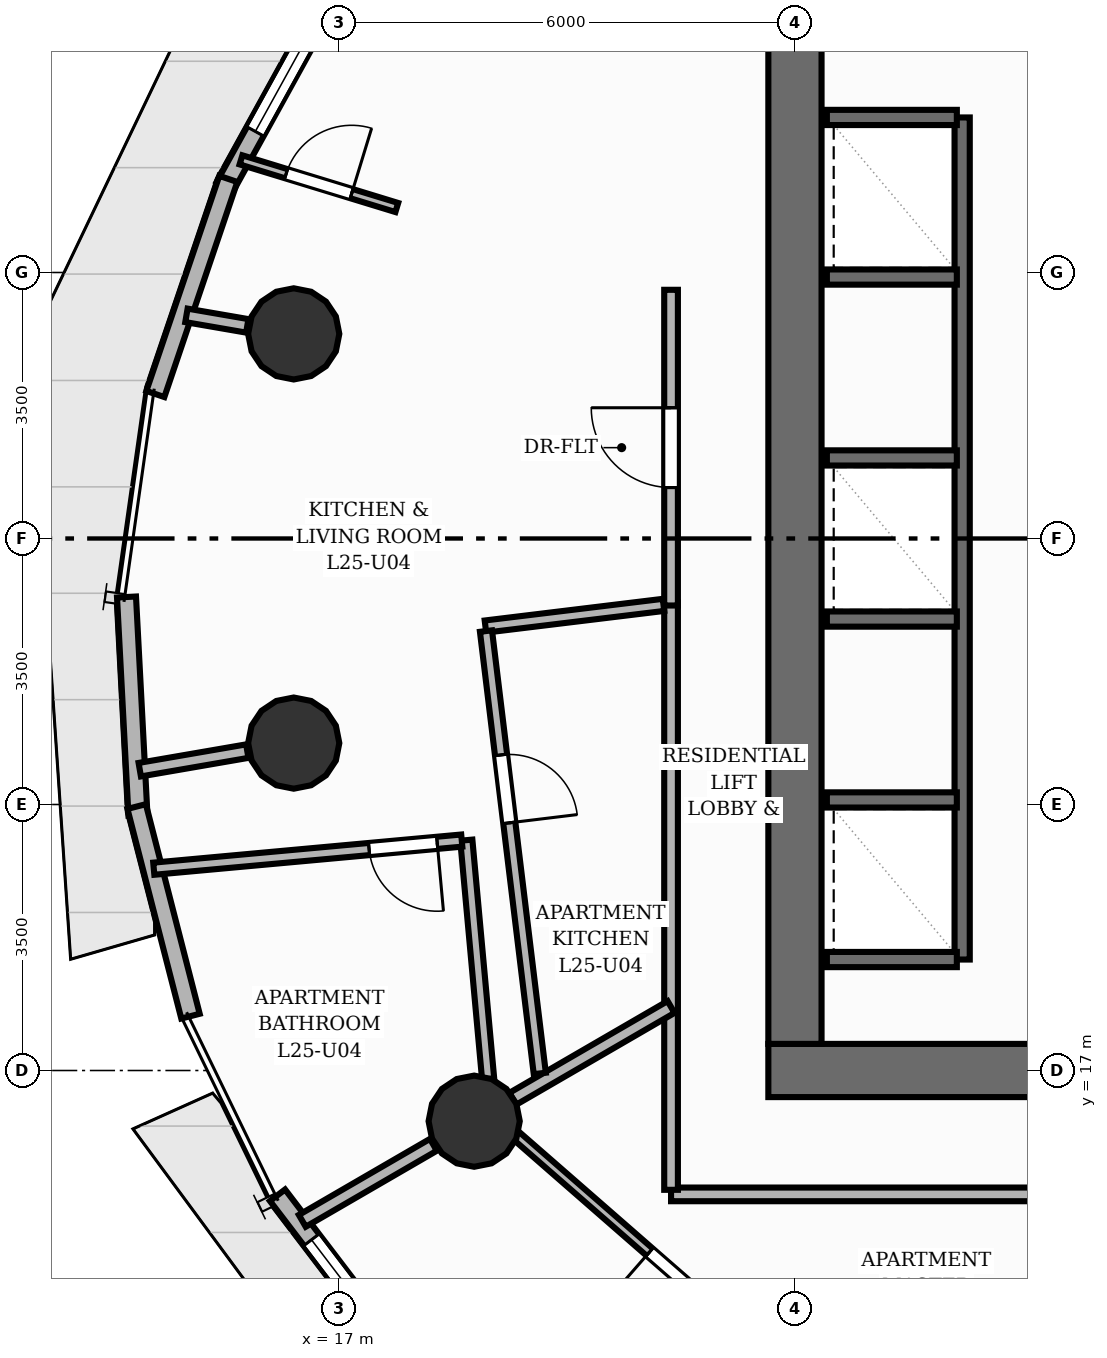
"""IFC4 building model, lengths in metres.
Left out: names, types, materials, properties, quantities, classifications, styles, units other than length and angle.
Written with IfcOpenShell. Run it as: python <this file> out.ifc"""

import sys

from ifc_helpers import new_model, si_unit, direction, frame, frame_2d, origin, origin_2d, place, context, subcontext, project, spatial, rectangle, circle, extrude, element, fill, save


model = new_model("IFC4")
c1 = context("Model", 3, precision=1e-05, world=origin(), true_north=direction((0.0, 1.0)))
c2 = subcontext(c1, "Body", "Model", "MODEL_VIEW")
j1 = project(units=[si_unit("LENGTHUNIT", "METRE"), si_unit("PLANEANGLEUNIT", "RADIAN")], contexts=[c1])
p1 = place(None, origin())
s1 = spatial("IfcSite", under=j1, at=p1, CompositionType="ELEMENT")
p2 = place(p1, origin())
s2 = spatial("IfcBuilding", under=s1, at=p2, CompositionType="ELEMENT")
p3 = place(p2, frame((0.0, 0.0, 86.88)))
s3 = spatial("IfcBuildingStorey", under=s2, at=p3, CompositionType="ELEMENT", Elevation=86.88)
p4 = place(p3, frame((22.65, 17.0, 0.0), z_axis=(0.0, 0.0, 1.0), x_axis=(1.0, 0.0, 0.0)))
e1 = element("IfcWall", 1, at=p4, inside=s3, PredefinedType="SHEAR", context=c2, shape_type="SweptSolid", body=[
    extrude(rectangle(XDim=18.7, YDim=0.7, at=frame_2d((9.35, 0.0))), origin(), (0.0, 0.0, 1.0), 3.2),
])
p5 = place(p4, frame((5.85, 0.0, 0.0)))
e2 = element("IfcOpeningElement", 2, at=p5, cuts=e1, PredefinedType="OPENING", context=c2, shape_type="SweptSolid", body=[
    extrude(rectangle(XDim=1.1, YDim=2.15, at=frame_2d((0.55, 1.075))), frame((0.0, 0.36, 0.0), z_axis=(0.0, -1.0, 0.0), x_axis=(1.0, 0.0, 0.0)), (0.0, 0.0, 1.0), 0.72),
])
p6 = place(p4, frame((9.4, 0.0, 0.0)))
e3 = element("IfcOpeningElement", 3, at=p6, cuts=e1, PredefinedType="OPENING", context=c2, shape_type="SweptSolid", body=[
    extrude(rectangle(XDim=0.9, YDim=2.1, at=frame_2d((0.45, 1.05))), frame((0.0, 0.36, 0.0), z_axis=(0.0, -1.0, 0.0), x_axis=(1.0, 0.0, 0.0)), (0.0, 0.0, 1.0), 0.72),
])
p7 = place(p3, frame((23.0, 17.35, 0.0), z_axis=(0.0, 0.0, 1.0), x_axis=(0.0, 1.0, 0.0)))
e4 = element("IfcWall", 4, at=p7, inside=s3, PredefinedType="SHEAR", context=c2, shape_type="SweptSolid", body=[
    extrude(rectangle(XDim=13.3, YDim=0.7, at=frame_2d((6.65, 0.0))), origin(), (0.0, 0.0, 1.0), 3.2),
])
for number, where, z_axis, x_axis in (
    (5, (16.406, 26.692, 0.0), (0.0, 0.0, 1.0), (1.0, 0.0, 0.0)),
    (6, (16.406, 21.308, 0.0), (0.0, 0.0, 1.0), (1.0, 0.0, 0.0)),
    (7, (18.78, 16.333, 0.0), (0.0, 0.0, 1.0), (1.0, 0.0, 0.0)),
):
    element("IfcColumn", number, at=place(p3, frame(where, z_axis=z_axis, x_axis=x_axis)), inside=s3, PredefinedType="COLUMN", context=c2, shape_type="SweptSolid", body=[
        extrude(circle(Radius=0.6, at=origin_2d()), origin(), (0.0, 0.0, 1.0), 3.2),
    ])
p8 = place(p3, frame((15.5, 28.629, 0.0), z_axis=(0.0, 0.0, 1.0), x_axis=(0.482904421948, 0.875673066426, 0.0)))
e8 = element("IfcWall", 8, at=p8, inside=s3, PredefinedType="SOLIDWALL", context=c2, shape_type="SweptSolid", body=[
    extrude(rectangle(XDim=3.061, YDim=0.25, at=frame_2d((1.53, 0.0))), origin(), (0.0, 0.0, 1.0), 2.96),
])
p9 = place(p8, frame((0.83, 0.0, 0.85)))
e9 = element("IfcOpeningElement", 9, at=p9, cuts=e8, PredefinedType="OPENING", context=c2, shape_type="SweptSolid", body=[
    extrude(rectangle(XDim=1.4, YDim=1.55, at=frame_2d((0.7, 0.775))), frame((0.0, 0.135, 0.0), z_axis=(0.0, -1.0, 0.0), x_axis=(1.0, 0.0, 0.0)), (0.0, 0.0, 1.0), 0.27),
])
p10 = place(p3, frame((14.585, 25.901, 0.0), z_axis=(0.0, 0.0, 1.0), x_axis=(0.321149814784, 0.947028403198, 0.0)))
e10 = element("IfcWall", 10, at=p10, inside=s3, PredefinedType="SOLIDWALL", context=c2, shape_type="SweptSolid", body=[
    extrude(rectangle(XDim=2.988, YDim=0.25, at=frame_2d((1.494, 0.0))), origin(), (0.0, 0.0, 1.0), 2.96),
])
p11 = place(p3, frame((14.356, 20.36, 0.0), z_axis=(0.0, 0.0, 1.0), x_axis=(-0.052411702269, 0.998625562193, 0.0)))
e11 = element("IfcWall", 11, at=p11, inside=s3, PredefinedType="SOLIDWALL", context=c2, shape_type="SweptSolid", body=[
    extrude(rectangle(XDim=2.874, YDim=0.25, at=frame_2d((1.437, 0.0))), origin(), (0.0, 0.0, 1.0), 2.96),
])
p12 = place(p3, frame((15.047, 17.715, 0.0), z_axis=(0.0, 0.0, 1.0), x_axis=(-0.248825035787, 0.96854845081, 0.0)))
e12 = element("IfcWall", 12, at=p12, inside=s3, PredefinedType="SOLIDWALL", context=c2, shape_type="SweptSolid", body=[
    extrude(rectangle(XDim=2.847, YDim=0.25, at=frame_2d((1.424, 0.0))), origin(), (0.0, 0.0, 1.0), 2.96),
])
p13 = place(p3, frame((17.935, 13.073, 0.0), z_axis=(0.0, 0.0, 1.0), x_axis=(-0.606166055027, 0.795338112838, 0.0)))
e13 = element("IfcWall", 13, at=p13, inside=s3, PredefinedType="SOLIDWALL", context=c2, shape_type="SweptSolid", body=[
    extrude(rectangle(XDim=2.874, YDim=0.25, at=frame_2d((1.437, 0.0))), origin(), (0.0, 0.0, 1.0), 2.96),
])
p14 = place(p13, frame((0.737, 0.0, 0.85)))
e14 = element("IfcOpeningElement", 14, at=p14, cuts=e13, PredefinedType="OPENING", context=c2, shape_type="SweptSolid", body=[
    extrude(rectangle(XDim=1.4, YDim=1.37, at=frame_2d((0.7, 0.685))), frame((0.0, 0.135, 0.0), z_axis=(0.0, -1.0, 0.0), x_axis=(1.0, 0.0, 0.0)), (0.0, 0.0, 1.0), 0.27),
])
p15 = place(p3, frame((25.2, 18.46, 0.0), z_axis=(0.0, 0.0, 1.0), x_axis=(0.0, 1.0, 0.0)))
e15 = element("IfcWall", 15, at=p15, inside=s3, PredefinedType="SHEAR", context=c2, shape_type="SweptSolid", body=[
    extrude(rectangle(XDim=11.08, YDim=0.2, at=frame_2d((5.54, 0.0))), origin(), (0.0, 0.0, 1.0), 3.2),
])
for number, where, z_axis, x_axis in (
    (16, (23.42, 18.46, 0.0), (0.0, 0.0, 1.0), (1.0, 0.0, 0.0)),
    (17, (23.42, 29.54, 0.0), (0.0, 0.0, 1.0), (1.0, 0.0, 0.0)),
    (18, (23.42, 20.56, 0.0), (0.0, 0.0, 1.0), (1.0, 0.0, 0.0)),
    (19, (23.42, 22.94, 0.0), (0.0, 0.0, 1.0), (1.0, 0.0, 0.0)),
    (20, (23.42, 25.06, 0.0), (0.0, 0.0, 1.0), (1.0, 0.0, 0.0)),
    (21, (23.42, 27.44, 0.0), (0.0, 0.0, 1.0), (1.0, 0.0, 0.0)),
):
    element("IfcWall", number, at=place(p3, frame(where, z_axis=z_axis, x_axis=x_axis)), inside=s3, PredefinedType="SHEAR", context=c2, shape_type="SweptSolid", body=[
        extrude(rectangle(XDim=1.71, YDim=0.2, at=frame_2d((0.855, 0.0))), origin(), (0.0, 0.0, 1.0), 3.2),
    ])
p16 = place(p3, frame((15.794, 26.798, 0.0), z_axis=(0.0, 0.0, 1.0), x_axis=(-0.985418430365, 0.170148514822, 0.0)))
e22 = element("IfcWall", 22, at=p16, inside=s3, PredefinedType="PARTITIONING", context=c2, shape_type="SweptSolid", body=[
    extrude(rectangle(XDim=0.812, YDim=0.18, at=frame_2d((0.406, 0.0))), origin(), (0.0, 0.0, 1.0), 2.261),
])
p17 = place(p3, frame((15.794, 21.202, 0.0), z_axis=(0.0, 0.0, 1.0), x_axis=(-0.985402123708, -0.170242928172, 0.0)))
e23 = element("IfcWall", 23, at=p17, inside=s3, PredefinedType="PARTITIONING", context=c2, shape_type="SweptSolid", body=[
    extrude(rectangle(XDim=1.436, YDim=0.18, at=frame_2d((0.718, 0.0))), origin(), (0.0, 0.0, 1.0), 2.261),
])
p18 = place(p3, frame((18.243, 16.022, 0.0), z_axis=(0.0, 0.0, 1.0), x_axis=(-0.865046065875, -0.501692439563, 0.0)))
e24 = element("IfcWall", 24, at=p18, inside=s3, PredefinedType="PARTITIONING", context=c2, shape_type="SweptSolid", body=[
    extrude(rectangle(XDim=1.994, YDim=0.18, at=frame_2d((0.997, 0.0))), origin(), (0.0, 0.0, 1.0), 2.261),
])
p19 = place(p3, frame((41.695, 15.37, 0.0), z_axis=(0.0, 0.0, 1.0), x_axis=(-1.0, 0.0, 0.0)))
e25 = element("IfcWall", 25, at=p19, inside=s3, PredefinedType="PARTITIONING", context=c2, shape_type="SweptSolid", body=[
    extrude(rectangle(XDim=20.325, YDim=0.18, at=frame_2d((10.163, 0.0))), origin(), (0.0, 0.0, 1.0), 2.955),
])
p20 = place(p19, frame((11.424, 0.0, 0.0)))
e26 = element("IfcOpeningElement", 26, at=p20, cuts=e25, PredefinedType="OPENING", context=c2, shape_type="SweptSolid", body=[
    extrude(rectangle(XDim=1.05, YDim=2.15, at=frame_2d((0.525, 1.075))), frame((0.0, 0.1, 0.0), z_axis=(0.0, -1.0, 0.0), x_axis=(1.0, 0.0, 0.0)), (0.0, 0.0, 1.0), 0.2),
])
p21 = place(p3, frame((21.37, 15.43, 0.0), z_axis=(0.0, 0.0, 1.0), x_axis=(0.0, 1.0, 0.0)))
e27 = element("IfcWall", 27, at=p21, inside=s3, PredefinedType="PARTITIONING", context=c2, shape_type="SweptSolid", body=[
    extrude(rectangle(XDim=7.727, YDim=0.18, at=frame_2d((3.863, 0.0))), origin(), (0.0, 0.0, 1.0), 2.955),
])
p22 = place(p3, frame((21.37, 23.118, 0.0), z_axis=(0.0, 0.0, 1.0), x_axis=(0.0, 1.0, 0.0)))
e28 = element("IfcWall", 28, at=p22, inside=s3, PredefinedType="PARTITIONING", context=c2, shape_type="SweptSolid", body=[
    extrude(rectangle(XDim=4.154, YDim=0.18, at=frame_2d((2.077, 0.0))), origin(), (0.0, 0.0, 1.0), 2.955),
])
p23 = place(p22, frame((1.552, 0.0, 0.0)))
e29 = element("IfcOpeningElement", 29, at=p23, cuts=e28, PredefinedType="OPENING", context=c2, shape_type="SweptSolid", body=[
    extrude(rectangle(XDim=1.05, YDim=2.15, at=frame_2d((0.525, 1.075))), frame((0.0, 0.1, 0.0), z_axis=(0.0, -1.0, 0.0), x_axis=(1.0, 0.0, 0.0)), (0.0, 0.0, 1.0), 0.2),
])
p24 = place(p3, frame((25.973, 10.322, 0.0), z_axis=(0.0, 0.0, 1.0), x_axis=(0.403235845427, 0.91509608947, 0.0)))
e30 = element("IfcWall", 30, at=p24, inside=s3, PredefinedType="PARTITIONING", context=c2, shape_type="SweptSolid", body=[
    extrude(rectangle(XDim=5.396, YDim=0.125, at=frame_2d((2.698, 0.0))), origin(), (0.0, 0.0, 1.0), 2.955),
])
p25 = place(p24, frame((2.248, 0.0, 0.0)))
e31 = element("IfcOpeningElement", 31, at=p25, cuts=e30, PredefinedType="OPENING", context=c2, shape_type="SweptSolid", body=[
    extrude(rectangle(XDim=0.9, YDim=2.1, at=frame_2d((0.45, 1.05))), frame((0.0, 0.073, 0.0), z_axis=(0.0, -1.0, 0.0), x_axis=(1.0, 0.0, 0.0)), (0.0, 0.0, 1.0), 0.145),
])
p26 = place(p3, frame((22.888, 13.04, 0.0), z_axis=(0.0, 0.0, 1.0), x_axis=(-0.753425123405, 0.657533712765, 0.0)))
e32 = element("IfcWall", 32, at=p26, inside=s3, PredefinedType="PARTITIONING", context=c2, shape_type="SweptSolid", body=[
    extrude(rectangle(XDim=4.72, YDim=0.125, at=frame_2d((2.36, 0.0))), origin(), (0.0, 0.0, 1.0), 2.404),
])
p27 = place(p26, frame((1.49, 0.0, 0.0)))
e33 = element("IfcOpeningElement", 33, at=p27, cuts=e32, PredefinedType="OPENING", context=c2, shape_type="SweptSolid", body=[
    extrude(rectangle(XDim=0.9, YDim=2.1, at=frame_2d((0.45, 1.05))), frame((0.0, 0.073, 0.0), z_axis=(0.0, -1.0, 0.0), x_axis=(1.0, 0.0, 0.0)), (0.0, 0.0, 1.0), 0.145),
])
p28 = place(p3, frame((19.288, 16.628, 0.0), z_axis=(0.0, 0.0, 1.0), x_axis=(0.86502326608, 0.501731750182, 0.0)))
e34 = element("IfcWall", 34, at=p28, inside=s3, PredefinedType="PARTITIONING", context=c2, shape_type="SweptSolid", body=[
    extrude(rectangle(XDim=2.407, YDim=0.18, at=frame_2d((1.204, 0.0))), origin(), (0.0, 0.0, 1.0), 2.261),
])
p29 = place(p3, frame((18.964, 16.887, 0.0), z_axis=(0.0, 0.0, 1.0), x_axis=(-0.091023836021, 0.995848714051, 0.0)))
e35 = element("IfcWall", 35, at=p29, inside=s3, PredefinedType="PLUMBINGWALL", context=c2, shape_type="SweptSolid", body=[
    extrude(rectangle(XDim=3.157, YDim=0.16, at=frame_2d((1.579, 0.0))), origin(), (0.0, 0.0, 1.0), 2.955),
])
p30 = place(p3, frame((18.616, 20.025, 0.0), z_axis=(0.0, 0.0, 1.0), x_axis=(-0.995848823867, -0.091022634561, 0.0)))
e36 = element("IfcWall", 36, at=p30, inside=s3, PredefinedType="PLUMBINGWALL", context=c2, shape_type="SweptSolid", body=[
    extrude(rectangle(XDim=4.069, YDim=0.16, at=frame_2d((2.034, 0.0))), origin(), (0.0, 0.0, 1.0), 2.642),
])
p31 = place(p30, frame((0.324, 0.0, 0.0)))
e37 = element("IfcOpeningElement", 37, at=p31, cuts=e36, PredefinedType="OPENING", context=c2, shape_type="SweptSolid", body=[
    extrude(rectangle(XDim=0.9, YDim=2.1, at=frame_2d((0.45, 1.05))), frame((0.0, 0.09, 0.0), z_axis=(0.0, -1.0, 0.0), x_axis=(1.0, 0.0, 0.0)), (0.0, 0.0, 1.0), 0.18),
])
p32 = place(p3, frame((15.712, 28.982, 0.0), z_axis=(0.0, 0.0, 1.0), x_axis=(0.956248079097, -0.292557022175, 0.0)))
e38 = element("IfcWall", 38, at=p32, inside=s3, PredefinedType="PARTITIONING", context=c2, shape_type="SweptSolid", body=[
    extrude(rectangle(XDim=2.144, YDim=0.125, at=frame_2d((1.072, 0.0))), origin(), (0.0, 0.0, 1.0), 2.642),
])
p33 = place(p32, frame((0.622, 0.0, 0.0)))
e39 = element("IfcOpeningElement", 39, at=p33, cuts=e38, PredefinedType="OPENING", context=c2, shape_type="SweptSolid", body=[
    extrude(rectangle(XDim=0.9, YDim=2.1, at=frame_2d((0.45, 1.05))), frame((0.0, 0.073, 0.0), z_axis=(0.0, -1.0, 0.0), x_axis=(1.0, 0.0, 0.0)), (0.0, 0.0, 1.0), 0.145),
])
p34 = place(p3, frame((21.271, 23.126, 0.0), z_axis=(0.0, 0.0, 1.0), x_axis=(-0.992687653986, -0.120711315224, 0.0)))
e40 = element("IfcWall", 40, at=p34, inside=s3, PredefinedType="PLUMBINGWALL", context=c2, shape_type="SweptSolid", body=[
    extrude(rectangle(XDim=2.36, YDim=0.16, at=frame_2d((1.18, 0.0))), origin(), (0.0, 0.0, 1.0), 2.955),
])
p35 = place(p3, frame((18.935, 22.782, 0.0), z_axis=(0.0, 0.0, 1.0), x_axis=(0.120703145243, -0.992688647426, 0.0)))
e41 = element("IfcWall", 41, at=p35, inside=s3, PredefinedType="PLUMBINGWALL", context=c2, shape_type="SweptSolid", body=[
    extrude(rectangle(XDim=5.864, YDim=0.16, at=frame_2d((2.932, 0.0))), origin(), (0.0, 0.0, 1.0), 2.955),
])
p36 = place(p35, frame((1.642, 0.0, 0.0)))
e42 = element("IfcOpeningElement", 42, at=p36, cuts=e41, PredefinedType="OPENING", context=c2, shape_type="SweptSolid", body=[
    extrude(rectangle(XDim=0.9, YDim=2.1, at=frame_2d((0.45, 1.05))), frame((0.0, 0.09, 0.0), z_axis=(0.0, -1.0, 0.0), x_axis=(1.0, 0.0, 0.0)), (0.0, 0.0, 1.0), 0.18),
])
p37 = place(p9, origin())
e43 = element("IfcWindow", 43, at=p37, inside=s3, PartitioningType="SINGLE_PANEL", PredefinedType="WINDOW", context=c2, shape_type="SweptSolid", body=[
    extrude(rectangle(XDim=1.4, YDim=1.55, at=frame_2d((0.7, 0.775))), frame((0.0, 0.03, 0.0), z_axis=(0.0, -1.0, 0.0), x_axis=(1.0, 0.0, 0.0)), (0.0, 0.0, 1.0), 0.06),
])
fill(e9, e43)
p38 = place(p14, origin())
e44 = element("IfcWindow", 44, at=p38, inside=s3, PartitioningType="SINGLE_PANEL", PredefinedType="WINDOW", context=c2, shape_type="SweptSolid", body=[
    extrude(rectangle(XDim=1.4, YDim=1.37, at=frame_2d((0.7, 0.685))), frame((0.0, 0.03, 0.0), z_axis=(0.0, -1.0, 0.0), x_axis=(1.0, 0.0, 0.0)), (0.0, 0.0, 1.0), 0.06),
])
fill(e14, e44)
p39 = place(p27, origin())
e45 = element("IfcDoor", 45, at=p39, inside=s3, OperationType="SINGLE_SWING_RIGHT", PredefinedType="DOOR", context=c2, shape_type="SweptSolid", body=[
    extrude(rectangle(XDim=0.9, YDim=2.1, at=frame_2d((0.45, 1.05))), frame((0.0, 0.025, 0.0), z_axis=(0.0, -1.0, 0.0), x_axis=(1.0, 0.0, 0.0)), (0.0, 0.0, 1.0), 0.05),
])
fill(e33, e45)
p40 = place(p23, origin())
e46 = element("IfcDoor", 46, at=p40, inside=s3, OperationType="SINGLE_SWING_RIGHT", PredefinedType="DOOR", context=c2, shape_type="SweptSolid", body=[
    extrude(rectangle(XDim=1.05, YDim=2.15, at=frame_2d((0.525, 1.075))), frame((0.0, 0.025, 0.0), z_axis=(0.0, -1.0, 0.0), x_axis=(1.0, 0.0, 0.0)), (0.0, 0.0, 1.0), 0.05),
])
fill(e29, e46)
p41 = place(p31, origin())
e47 = element("IfcDoor", 47, at=p41, inside=s3, OperationType="SINGLE_SWING_LEFT", PredefinedType="DOOR", context=c2, shape_type="SweptSolid", body=[
    extrude(rectangle(XDim=0.9, YDim=2.1, at=frame_2d((0.45, 1.05))), frame((0.0, 0.025, 0.0), z_axis=(0.0, -1.0, 0.0), x_axis=(1.0, 0.0, 0.0)), (0.0, 0.0, 1.0), 0.05),
])
fill(e37, e47)
p42 = place(p33, origin())
e48 = element("IfcDoor", 48, at=p42, inside=s3, OperationType="SINGLE_SWING_RIGHT", PredefinedType="DOOR", context=c2, shape_type="SweptSolid", body=[
    extrude(rectangle(XDim=0.9, YDim=2.1, at=frame_2d((0.45, 1.05))), frame((0.0, 0.025, 0.0), z_axis=(0.0, -1.0, 0.0), x_axis=(1.0, 0.0, 0.0)), (0.0, 0.0, 1.0), 0.05),
])
fill(e39, e48)
p43 = place(p36, origin())
e49 = element("IfcDoor", 49, at=p43, inside=s3, OperationType="SINGLE_SWING_RIGHT", PredefinedType="DOOR", context=c2, shape_type="SweptSolid", body=[
    extrude(rectangle(XDim=0.9, YDim=2.1, at=frame_2d((0.45, 1.05))), frame((0.0, 0.025, 0.0), z_axis=(0.0, -1.0, 0.0), x_axis=(1.0, 0.0, 0.0)), (0.0, 0.0, 1.0), 0.05),
])
fill(e42, e49)
save(model, sys.argv[1])
